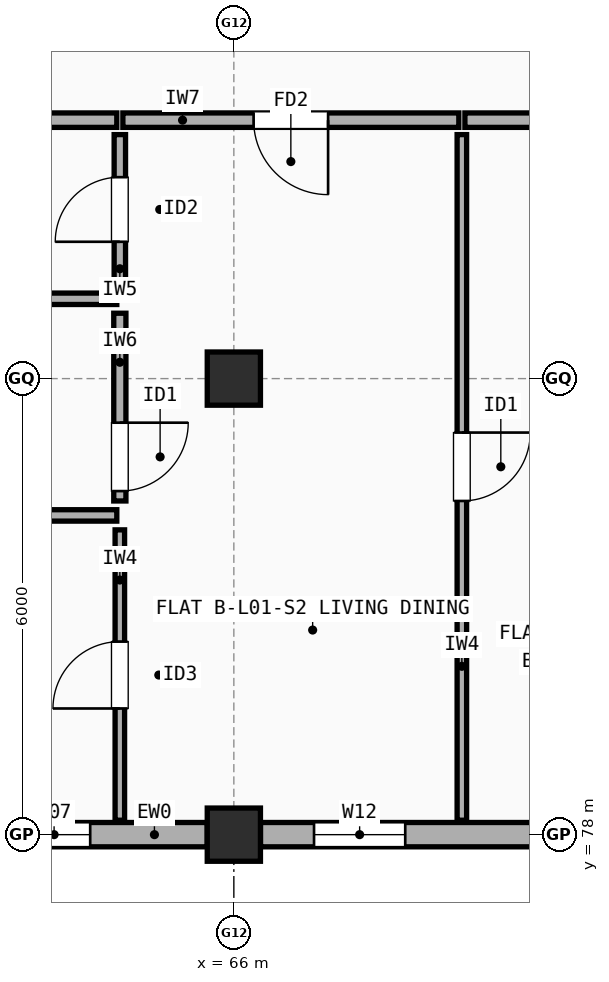
"""IFC4 building model, lengths in metres.
Left out: names, types, materials, properties, quantities, classifications, styles, units other than length and angle.
Written with IfcOpenShell. Run it as: python <this file> out.ifc"""

import sys

from ifc_helpers import new_model, si_unit, direction, frame, frame_2d, origin, origin_2d, place, context, subcontext, project, spatial, rectangle, extrude, element, fill, save


model = new_model("IFC4")
c1 = context("Model", 3, precision=1e-05, world=origin(), true_north=direction((0.0, 1.0)))
c2 = subcontext(c1, "Body", "Model", "MODEL_VIEW")
j1 = project(units=[si_unit("LENGTHUNIT", "METRE"), si_unit("PLANEANGLEUNIT", "RADIAN")], contexts=[c1])
p1 = place(None, origin())
s1 = spatial("IfcSite", under=j1, at=p1, CompositionType="ELEMENT")
p2 = place(p1, origin())
s2 = spatial("IfcBuilding", under=s1, at=p2, CompositionType="ELEMENT")
p3 = place(p2, frame((0.0, 0.0, 4.5)))
s3 = spatial("IfcBuildingStorey", under=s2, at=p3, CompositionType="ELEMENT", Elevation=4.5)
for number, where, z_axis, x_axis in (
    (1, (66.0, 78.0, 0.0), (0.0, 0.0, 1.0), (1.0, 0.0, 0.0)),
    (2, (66.0, 84.0, 0.0), (0.0, 0.0, 1.0), (1.0, 0.0, 0.0)),
):
    element("IfcColumn", number, at=place(p3, frame(where, z_axis=z_axis, x_axis=x_axis)), inside=s3, PredefinedType="COLUMN", context=c2, shape_type="SweptSolid", body=[
        extrude(rectangle(XDim=0.7, YDim=0.7, at=origin_2d()), origin(), (0.0, 0.0, 1.0), 2.945),
    ])
p4 = place(p3, frame((60.35, 78.0, 0.0), z_axis=(0.0, 0.0, 1.0), x_axis=(1.0, 0.0, 0.0)))
e3 = element("IfcWall", 3, at=p4, inside=s3, PredefinedType="STANDARD", context=c2, shape_type="SweptSolid", body=[
    extrude(rectangle(XDim=5.3, YDim=0.32, at=frame_2d((2.65, 0.0))), origin(), (0.0, 0.0, 1.0), 2.427),
])
p5 = place(p4, frame((0.35, 0.0, 0.9)))
e4 = element("IfcOpeningElement", 4, at=p5, cuts=e3, PredefinedType="OPENING", context=c2, shape_type="SweptSolid", body=[
    extrude(rectangle(XDim=0.95, YDim=1.35, at=frame_2d((0.475, 0.675))), frame((0.0, 0.17, 0.0), z_axis=(0.0, -1.0, 0.0), x_axis=(1.0, 0.0, 0.0)), (0.0, 0.0, 1.0), 0.34),
])
p6 = place(p4, frame((2.81, 0.0, 0.9)))
e5 = element("IfcOpeningElement", 5, at=p6, cuts=e3, PredefinedType="OPENING", context=c2, shape_type="SweptSolid", body=[
    extrude(rectangle(XDim=0.95, YDim=1.35, at=frame_2d((0.475, 0.675))), frame((0.0, 0.17, 0.0), z_axis=(0.0, -1.0, 0.0), x_axis=(1.0, 0.0, 0.0)), (0.0, 0.0, 1.0), 0.34),
])
p7 = place(p3, frame((66.35, 78.0, 0.0), z_axis=(0.0, 0.0, 1.0), x_axis=(1.0, 0.0, 0.0)))
e6 = element("IfcWall", 6, at=p7, inside=s3, PredefinedType="STANDARD", context=c2, shape_type="SweptSolid", body=[
    extrude(rectangle(XDim=5.3, YDim=0.32, at=frame_2d((2.65, 0.0))), origin(), (0.0, 0.0, 1.0), 2.427),
])
p8 = place(p7, frame((0.705, 0.0, 0.9)))
e7 = element("IfcOpeningElement", 7, at=p8, cuts=e6, PredefinedType="OPENING", context=c2, shape_type="SweptSolid", body=[
    extrude(rectangle(XDim=1.2, YDim=1.35, at=frame_2d((0.6, 0.675))), frame((0.0, 0.17, 0.0), z_axis=(0.0, -1.0, 0.0), x_axis=(1.0, 0.0, 0.0)), (0.0, 0.0, 1.0), 0.34),
])
p9 = place(p7, frame((3.595, 0.0, 0.9)))
e8 = element("IfcOpeningElement", 8, at=p9, cuts=e6, PredefinedType="OPENING", context=c2, shape_type="SweptSolid", body=[
    extrude(rectangle(XDim=0.8, YDim=1.2, at=frame_2d((0.4, 0.6))), frame((0.0, 0.17, 0.0), z_axis=(0.0, -1.0, 0.0), x_axis=(1.0, 0.0, 0.0)), (0.0, 0.0, 1.0), 0.34),
])
p10 = place(p3, frame((60.04, 87.4, 0.0), z_axis=(0.0, 0.0, 1.0), x_axis=(1.0, 0.0, 0.0)))
e9 = element("IfcWall", 9, at=p10, inside=s3, PredefinedType="SOLIDWALL", context=c2, shape_type="SweptSolid", body=[
    extrude(rectangle(XDim=4.42, YDim=0.19, at=frame_2d((2.21, 0.0))), origin(), (0.0, 0.0, 1.0), 2.327),
])
p11 = place(p3, frame((64.54, 87.4, 0.0), z_axis=(0.0, 0.0, 1.0), x_axis=(1.0, 0.0, 0.0)))
e10 = element("IfcWall", 10, at=p11, inside=s3, PredefinedType="SOLIDWALL", context=c2, shape_type="SweptSolid", body=[
    extrude(rectangle(XDim=4.42, YDim=0.19, at=frame_2d((2.21, 0.0))), origin(), (0.0, 0.0, 1.0), 2.327),
])
p12 = place(p11, frame((1.72, 0.0, 0.0)))
e11 = element("IfcOpeningElement", 11, at=p12, cuts=e10, PredefinedType="OPENING", context=c2, shape_type="SweptSolid", body=[
    extrude(rectangle(XDim=0.98, YDim=2.15, at=frame_2d((0.49, 1.075))), frame((0.0, 0.105, 0.0), z_axis=(0.0, -1.0, 0.0), x_axis=(1.0, 0.0, 0.0)), (0.0, 0.0, 1.0), 0.21),
])
p13 = place(p3, frame((64.5, 78.19, 0.0), z_axis=(0.0, 0.0, 1.0), x_axis=(0.0, 1.0, 0.0)))
e12 = element("IfcWall", 12, at=p13, inside=s3, PredefinedType="PARTITIONING", context=c2, shape_type="SweptSolid", body=[
    extrude(rectangle(XDim=3.82, YDim=0.125, at=frame_2d((1.91, 0.0))), origin(), (0.0, 0.0, 1.0), 2.945),
])
p14 = place(p13, frame((1.47, 0.0, 0.0)))
e13 = element("IfcOpeningElement", 13, at=p14, cuts=e12, PredefinedType="OPENING", context=c2, shape_type="SweptSolid", body=[
    extrude(rectangle(XDim=0.88, YDim=2.1, at=frame_2d((0.44, 1.05))), frame((0.0, 0.073, 0.0), z_axis=(0.0, -1.0, 0.0), x_axis=(1.0, 0.0, 0.0)), (0.0, 0.0, 1.0), 0.145),
])
p15 = place(p3, frame((64.5, 82.39, 0.0), z_axis=(0.0, 0.0, 1.0), x_axis=(0.0, 1.0, 0.0)))
e14 = element("IfcWall", 14, at=p15, inside=s3, PredefinedType="PLUMBINGWALL", context=c2, shape_type="SweptSolid", body=[
    extrude(rectangle(XDim=2.47, YDim=0.16, at=frame_2d((1.235, 0.0))), origin(), (0.0, 0.0, 1.0), 2.427),
])
p16 = place(p15, frame((0.13, 0.0, 0.0)))
e15 = element("IfcOpeningElement", 15, at=p16, cuts=e14, PredefinedType="OPENING", context=c2, shape_type="SweptSolid", body=[
    extrude(rectangle(XDim=0.9, YDim=2.1, at=frame_2d((0.45, 1.05))), frame((0.0, 0.09, 0.0), z_axis=(0.0, -1.0, 0.0), x_axis=(1.0, 0.0, 0.0)), (0.0, 0.0, 1.0), 0.18),
])
p17 = place(p3, frame((64.5, 85.24, 0.0), z_axis=(0.0, 0.0, 1.0), x_axis=(0.0, 1.0, 0.0)))
e16 = element("IfcWall", 16, at=p17, inside=s3, PredefinedType="PARTITIONING", context=c2, shape_type="SweptSolid", body=[
    extrude(rectangle(XDim=1.97, YDim=0.15, at=frame_2d((0.985, 0.0))), origin(), (0.0, 0.0, 1.0), 2.945),
])
p18 = place(p17, frame((0.56, 0.0, 0.0)))
e17 = element("IfcOpeningElement", 17, at=p18, cuts=e16, PredefinedType="OPENING", context=c2, shape_type="SweptSolid", body=[
    extrude(rectangle(XDim=0.85, YDim=2.1, at=frame_2d((0.425, 1.05))), frame((0.0, 0.085, 0.0), z_axis=(0.0, -1.0, 0.0), x_axis=(1.0, 0.0, 0.0)), (0.0, 0.0, 1.0), 0.17),
])
for number, where, z_axis, x_axis in (
    (18, (60.04, 82.2, 0.0), (0.0, 0.0, 1.0), (1.0, 0.0, 0.0)),
    (19, (60.04, 85.05, 0.0), (0.0, 0.0, 1.0), (1.0, 0.0, 0.0)),
):
    element("IfcWall", number, at=place(p3, frame(where, z_axis=z_axis, x_axis=x_axis)), inside=s3, PredefinedType="PARTITIONING", context=c2, shape_type="SweptSolid", body=[
        extrude(rectangle(XDim=4.42, YDim=0.15, at=frame_2d((2.21, 0.0))), origin(), (0.0, 0.0, 1.0), 2.327),
    ])
p19 = place(p3, frame((69.04, 87.4, 0.0), z_axis=(0.0, 0.0, 1.0), x_axis=(1.0, 0.0, 0.0)))
e20 = element("IfcWall", 20, at=p19, inside=s3, PredefinedType="SOLIDWALL", context=c2, shape_type="SweptSolid", body=[
    extrude(rectangle(XDim=2.92, YDim=0.19, at=frame_2d((1.46, 0.0))), origin(), (0.0, 0.0, 1.0), 2.327),
])
p20 = place(p3, frame((69.0, 78.19, 0.0), z_axis=(0.0, 0.0, 1.0), x_axis=(0.0, 1.0, 0.0)))
e21 = element("IfcWall", 21, at=p20, inside=s3, PredefinedType="PARTITIONING", context=c2, shape_type="SweptSolid", body=[
    extrude(rectangle(XDim=9.02, YDim=0.125, at=frame_2d((4.51, 0.0))), origin(), (0.0, 0.0, 1.0), 2.427),
])
p21 = place(p20, frame((4.2, 0.0, 0.0)))
e22 = element("IfcOpeningElement", 22, at=p21, cuts=e21, PredefinedType="OPENING", context=c2, shape_type="SweptSolid", body=[
    extrude(rectangle(XDim=0.9, YDim=2.1, at=frame_2d((0.45, 1.05))), frame((0.0, 0.073, 0.0), z_axis=(0.0, -1.0, 0.0), x_axis=(1.0, 0.0, 0.0)), (0.0, 0.0, 1.0), 0.145),
])
p22 = place(p6, origin())
e23 = element("IfcWindow", 23, at=p22, inside=s3, PartitioningType="SINGLE_PANEL", PredefinedType="WINDOW", context=c2, shape_type="SweptSolid", body=[
    extrude(rectangle(XDim=0.95, YDim=1.35, at=frame_2d((0.475, 0.675))), frame((0.0, 0.03, 0.0), z_axis=(0.0, -1.0, 0.0), x_axis=(1.0, 0.0, 0.0)), (0.0, 0.0, 1.0), 0.06),
])
fill(e5, e23)
p23 = place(p8, origin())
e24 = element("IfcWindow", 24, at=p23, inside=s3, PartitioningType="SINGLE_PANEL", PredefinedType="WINDOW", context=c2, shape_type="SweptSolid", body=[
    extrude(rectangle(XDim=1.2, YDim=1.35, at=frame_2d((0.6, 0.675))), frame((0.0, 0.03, 0.0), z_axis=(0.0, -1.0, 0.0), x_axis=(1.0, 0.0, 0.0)), (0.0, 0.0, 1.0), 0.06),
])
fill(e7, e24)
p24 = place(p12, origin())
e25 = element("IfcDoor", 25, at=p24, inside=s3, OperationType="SINGLE_SWING_RIGHT", PredefinedType="DOOR", context=c2, shape_type="SweptSolid", body=[
    extrude(rectangle(XDim=0.98, YDim=2.15, at=frame_2d((0.49, 1.075))), frame((0.0, 0.025, 0.0), z_axis=(0.0, -1.0, 0.0), x_axis=(1.0, 0.0, 0.0)), (0.0, 0.0, 1.0), 0.05),
])
fill(e11, e25)
p25 = place(p14, origin())
e26 = element("IfcDoor", 26, at=p25, inside=s3, OperationType="SINGLE_SWING_LEFT", PredefinedType="DOOR", context=c2, shape_type="SweptSolid", body=[
    extrude(rectangle(XDim=0.88, YDim=2.1, at=frame_2d((0.44, 1.05))), frame((0.0, 0.025, 0.0), z_axis=(0.0, -1.0, 0.0), x_axis=(1.0, 0.0, 0.0)), (0.0, 0.0, 1.0), 0.05),
])
fill(e13, e26)
p26 = place(p16, origin())
e27 = element("IfcDoor", 27, at=p26, inside=s3, OperationType="SINGLE_SWING_RIGHT", PredefinedType="DOOR", context=c2, shape_type="SweptSolid", body=[
    extrude(rectangle(XDim=0.9, YDim=2.1, at=frame_2d((0.45, 1.05))), frame((0.0, 0.025, 0.0), z_axis=(0.0, -1.0, 0.0), x_axis=(1.0, 0.0, 0.0)), (0.0, 0.0, 1.0), 0.05),
])
fill(e15, e27)
p27 = place(p18, origin())
e28 = element("IfcDoor", 28, at=p27, inside=s3, OperationType="SINGLE_SWING_LEFT", PredefinedType="DOOR", context=c2, shape_type="SweptSolid", body=[
    extrude(rectangle(XDim=0.85, YDim=2.1, at=frame_2d((0.425, 1.05))), frame((0.0, 0.025, 0.0), z_axis=(0.0, -1.0, 0.0), x_axis=(1.0, 0.0, 0.0)), (0.0, 0.0, 1.0), 0.05),
])
fill(e17, e28)
p28 = place(p21, origin())
e29 = element("IfcDoor", 29, at=p28, inside=s3, OperationType="SINGLE_SWING_RIGHT", PredefinedType="DOOR", context=c2, shape_type="SweptSolid", body=[
    extrude(rectangle(XDim=0.9, YDim=2.1, at=frame_2d((0.45, 1.05))), frame((0.0, 0.025, 0.0), z_axis=(0.0, -1.0, 0.0), x_axis=(1.0, 0.0, 0.0)), (0.0, 0.0, 1.0), 0.05),
])
fill(e22, e29)
save(model, sys.argv[1])
